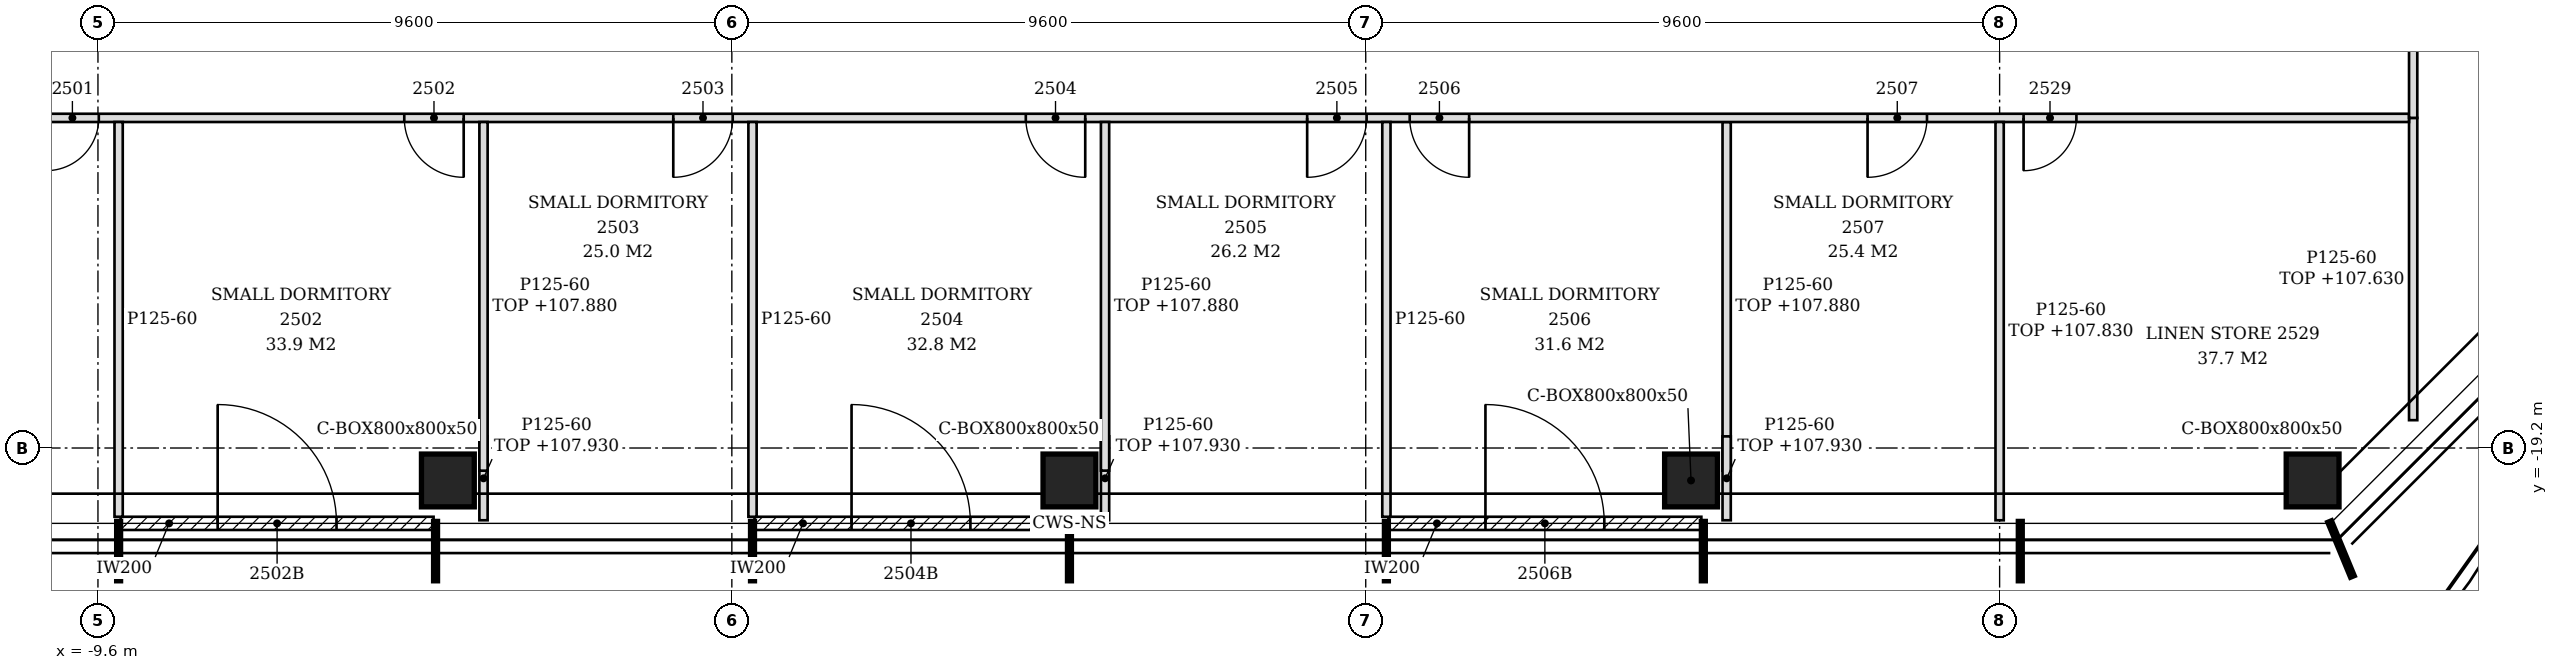
"""IFC4 building model, lengths in metres.
Left out: names, types, materials, properties, quantities, classifications, styles, units other than length and angle.
Written with IfcOpenShell. Run it as: python <this file> out.ifc"""

import sys

from ifc_helpers import new_model, si_unit, direction, frame, frame_2d, origin, origin_2d, place, context, subcontext, project, spatial, polyline, rectangle, hollow_rectangle, outline, extrude, clip, halfspace, element, fill, save


model = new_model("IFC4")
c1 = context("Model", 3, precision=1e-05, world=origin(), true_north=direction((0.0, 1.0)))
c2 = subcontext(c1, "Body", "Model", "MODEL_VIEW")
j1 = project(units=[si_unit("LENGTHUNIT", "METRE"), si_unit("PLANEANGLEUNIT", "RADIAN")], contexts=[c1])
p1 = place(None, origin())
s1 = spatial("IfcSite", under=j1, at=p1, CompositionType="ELEMENT")
p2 = place(p1, origin())
s2 = spatial("IfcBuilding", under=s1, at=p2, CompositionType="ELEMENT")
p3 = place(p2, frame((0.0, 0.0, 105.0)))
s3 = spatial("IfcBuildingStorey", under=s2, at=p3, CompositionType="ELEMENT", Elevation=105.0)
for number, where, z_axis, x_axis in (
    (1, (-4.301, -19.691, -0.15), (0.282, 0.188, 0.941), (-0.555, 0.832, 0.0)),
    (2, (5.113, -19.691, -0.15), (0.282, 0.188, 0.941), (-0.555, 0.832, 0.0)),
    (3, (14.527, -19.691, -0.15), (0.282, 0.188, 0.941), (-0.555, 0.832, 0.0)),
    (4, (23.94, -19.691, -0.15), (0.282, 0.188, 0.941), (-0.555, 0.832, 0.0)),
):
    element("IfcColumn", number, at=place(p3, frame(where, z_axis=z_axis, x_axis=x_axis)), inside=s3, PredefinedType="COLUMN", context=c2, shape_type="Clipping", body=[
        clip(clip(extrude(hollow_rectangle(XDim=0.8, YDim=0.8, WallThickness=0.05, at=origin_2d()), origin(), (0.0, 0.0, 1.0), 3.826), halfspace(frame((0.0, 0.0, 0.024), z_axis=(0.0, 0.0, 1.0), x_axis=(1.0, 0.0, 0.0)), True)), halfspace(frame((0.0, 0.0, 3.802), z_axis=(0.0, 0.0, 1.0), x_axis=(1.0, 0.0, 0.0)), False)),
    ])
p4 = place(p3, frame((-9.257, -20.341, 0.0), z_axis=(0.0, 0.0, 1.0), x_axis=(1.0, 0.0, 0.0)))
e5 = element("IfcWall", 5, at=p4, inside=s3, PredefinedType="NOTDEFINED", context=c2, shape_type="SweptSolid", body=[
    extrude(rectangle(XDim=4.74, YDim=0.2, at=frame_2d((2.37, 0.0))), origin(), (0.0, 0.0, 1.0), 3.45),
])
p5 = place(p4, frame((1.47, 0.0, 0.0)))
e6 = element("IfcOpeningElement", 6, at=p5, cuts=e5, PredefinedType="OPENING", context=c2, shape_type="SweptSolid", body=[
    extrude(rectangle(XDim=1.8, YDim=2.4, at=frame_2d((0.9, 1.2))), frame((0.0, 0.11, 0.0), z_axis=(0.0, -1.0, 0.0), x_axis=(1.0, 0.0, 0.0)), (0.0, 0.0, 1.0), 0.22),
])
p6 = place(p3, frame((0.343, -20.341, 0.0), z_axis=(0.0, 0.0, 1.0), x_axis=(1.0, 0.0, 0.0)))
e7 = element("IfcWall", 7, at=p6, inside=s3, PredefinedType="NOTDEFINED", context=c2, shape_type="SweptSolid", body=[
    extrude(rectangle(XDim=4.74, YDim=0.2, at=frame_2d((2.37, 0.0))), origin(), (0.0, 0.0, 1.0), 3.45),
])
p7 = place(p6, frame((1.47, 0.0, 0.0)))
e8 = element("IfcOpeningElement", 8, at=p7, cuts=e7, PredefinedType="OPENING", context=c2, shape_type="SweptSolid", body=[
    extrude(rectangle(XDim=1.8, YDim=2.4, at=frame_2d((0.9, 1.2))), frame((0.0, 0.11, 0.0), z_axis=(0.0, -1.0, 0.0), x_axis=(1.0, 0.0, 0.0)), (0.0, 0.0, 1.0), 0.22),
])
p8 = place(p3, frame((9.943, -20.341, 0.0), z_axis=(0.0, 0.0, 1.0), x_axis=(1.0, 0.0, 0.0)))
e9 = element("IfcWall", 9, at=p8, inside=s3, PredefinedType="NOTDEFINED", context=c2, shape_type="SweptSolid", body=[
    extrude(rectangle(XDim=4.74, YDim=0.2, at=frame_2d((2.37, 0.0))), origin(), (0.0, 0.0, 1.0), 3.45),
])
p9 = place(p8, frame((1.47, 0.0, 0.0)))
e10 = element("IfcOpeningElement", 10, at=p9, cuts=e9, PredefinedType="OPENING", context=c2, shape_type="SweptSolid", body=[
    extrude(rectangle(XDim=1.8, YDim=2.4, at=frame_2d((0.9, 1.2))), frame((0.0, 0.11, 0.0), z_axis=(0.0, -1.0, 0.0), x_axis=(1.0, 0.0, 0.0)), (0.0, 0.0, 1.0), 0.22),
])
p10 = place(p3, frame((-3.761, -20.294, 0.0), z_axis=(0.0, 0.0, 1.0), x_axis=(0.0, 1.0, 0.0)))
e11 = element("IfcWall", 11, at=p10, inside=s3, PredefinedType="PARTITIONING", context=c2, shape_type="SweptSolid", body=[
    extrude(outline(polyline([(0.0, 0.0), (0.44, 0.0), (0.44, 0.863), (0.44, 1.725), (0.71, 2.587), (0.933, 2.93), (0.0, 2.93), (0.0, 2.587), (0.0, 1.725), (0.0, 0.863), (0.0, 0.0)])), frame((0.0, 0.062, 0.0), z_axis=(0.0, -1.0, 0.0), x_axis=(1.0, 0.0, 0.0)), (0.0, 0.0, 1.0), 0.125),
])
p11 = place(p3, frame((5.652, -20.294, 0.0), z_axis=(0.0, 0.0, 1.0), x_axis=(0.0, 1.0, 0.0)))
e12 = element("IfcWall", 12, at=p11, inside=s3, PredefinedType="PARTITIONING", context=c2, shape_type="SweptSolid", body=[
    extrude(outline(polyline([(0.0, 0.0), (0.44, 0.0), (0.44, 0.863), (0.44, 1.725), (0.711, 2.587), (0.934, 2.93), (0.0, 2.93), (0.0, 2.587), (0.0, 1.725), (0.0, 0.863), (0.0, 0.0)])), frame((0.0, 0.062, 0.0), z_axis=(0.0, -1.0, 0.0), x_axis=(1.0, 0.0, 0.0)), (0.0, 0.0, 1.0), 0.125),
])
p12 = place(p3, frame((15.066, -20.294, 0.0), z_axis=(0.0, 0.0, 1.0), x_axis=(0.0, 1.0, 0.0)))
e13 = element("IfcWall", 13, at=p12, inside=s3, PredefinedType="PARTITIONING", context=c2, shape_type="SweptSolid", body=[
    extrude(outline(polyline([(0.0, 0.0), (0.44, 0.0), (0.44, 0.863), (0.44, 1.725), (0.711, 2.587), (0.933, 2.93), (0.0, 2.93), (0.0, 2.587), (0.0, 1.725), (0.0, 0.863), (0.0, 0.0)])), frame((0.0, 0.062, 0.0), z_axis=(0.0, -1.0, 0.0), x_axis=(1.0, 0.0, 0.0)), (0.0, 0.0, 1.0), 0.125),
])
p13 = place(p3, frame((19.2, -20.294, 0.0), z_axis=(0.0, 0.0, 1.0), x_axis=(0.0, 1.0, 0.0)))
e14 = element("IfcWall", 14, at=p13, inside=s3, PredefinedType="PARTITIONING", context=c2, shape_type="SweptSolid", body=[
    extrude(rectangle(XDim=6.032, YDim=0.125, at=frame_2d((3.016, 0.0))), origin(), (0.0, 0.0, 1.0), 2.83),
])
p14 = place(p3, frame((-9.287, -20.241, 0.0), z_axis=(0.0, 0.0, 1.0), x_axis=(0.0, 1.0, 0.0)))
e15 = element("IfcWall", 15, at=p14, inside=s3, PredefinedType="PARTITIONING", context=c2, shape_type="SweptSolid", body=[
    extrude(outline(polyline([(0.0, 0.0), (5.979, 0.0), (5.979, 3.45), (5.269, 3.45), (5.267, 2.93), (5.069, 2.93), (5.067, 3.45), (1.419, 3.45), (1.417, 2.93), (1.119, 2.93), (1.117, 3.45), (0.0, 3.45), (0.0, 0.0)])), frame((0.0, 0.062, 0.0), z_axis=(0.0, -1.0, 0.0), x_axis=(1.0, 0.0, 0.0)), (0.0, 0.0, 1.0), 0.125),
])
for number, where, z_axis, x_axis in (
    (16, (0.313, -20.241, 0.0), (0.0, 0.0, 1.0), (0.0, 1.0, 0.0)),
    (17, (9.913, -20.241, 0.0), (0.0, 0.0, 1.0), (0.0, 1.0, 0.0)),
):
    element("IfcWall", number, at=place(p3, frame(where, z_axis=z_axis, x_axis=x_axis)), inside=s3, PredefinedType="PARTITIONING", context=c2, shape_type="SweptSolid", body=[
        extrude(outline(polyline([(0.0, 0.0), (5.979, 0.0), (5.979, 3.45), (5.274, 3.45), (5.272, 2.88), (5.064, 2.88), (5.062, 3.45), (1.419, 3.45), (1.417, 2.93), (1.119, 2.93), (1.117, 3.45), (0.0, 3.45), (0.0, 0.0)])), frame((0.0, 0.062, 0.0), z_axis=(0.0, -1.0, 0.0), x_axis=(1.0, 0.0, 0.0)), (0.0, 0.0, 1.0), 0.125),
    ])
p15 = place(p3, frame((-3.761, -19.543, 0.0), z_axis=(0.0, 0.0, 1.0), x_axis=(0.0, 1.0, 0.0)))
e18 = element("IfcWall", 18, at=p15, inside=s3, PredefinedType="PARTITIONING", context=c2, shape_type="SweptSolid", body=[
    extrude(outline(polyline([(0.0, 0.0), (5.281, 0.0), (5.281, 0.863), (5.281, 1.725), (5.281, 2.587), (5.281, 2.88), (0.734, 2.88), (0.734, 2.587), (0.734, 1.725), (0.56, 0.863), (0.0, 0.0)])), frame((0.0, 0.062, 0.0), z_axis=(0.0, -1.0, 0.0), x_axis=(1.0, 0.0, 0.0)), (0.0, 0.0, 1.0), 0.125),
])
p16 = place(p3, frame((5.652, -19.542, 0.0), z_axis=(0.0, 0.0, 1.0), x_axis=(0.0, 1.0, 0.0)))
e19 = element("IfcWall", 19, at=p16, inside=s3, PredefinedType="PARTITIONING", context=c2, shape_type="SweptSolid", body=[
    extrude(outline(polyline([(0.0, 0.0), (5.28, 0.0), (5.28, 0.863), (5.28, 1.725), (5.28, 2.587), (5.28, 2.88), (0.733, 2.88), (0.733, 2.587), (0.733, 1.725), (0.56, 0.863), (0.0, 0.0)])), frame((0.0, 0.062, 0.0), z_axis=(0.0, -1.0, 0.0), x_axis=(1.0, 0.0, 0.0)), (0.0, 0.0, 1.0), 0.125),
])
p17 = place(p3, frame((15.066, -19.543, 0.0), z_axis=(0.0, 0.0, 1.0), x_axis=(0.0, 1.0, 0.0)))
e20 = element("IfcWall", 20, at=p17, inside=s3, PredefinedType="PARTITIONING", context=c2, shape_type="SweptSolid", body=[
    extrude(outline(polyline([(0.0, 0.0), (5.281, 0.0), (5.281, 0.863), (5.281, 1.725), (5.281, 2.587), (5.281, 2.88), (0.734, 2.88), (0.734, 2.587), (0.734, 1.725), (0.56, 0.863), (0.0, 0.0)])), frame((0.0, 0.062, 0.0), z_axis=(0.0, -1.0, 0.0), x_axis=(1.0, 0.0, 0.0)), (0.0, 0.0, 1.0), 0.125),
])
p18 = place(p3, frame((25.463, -18.778, 0.0), z_axis=(0.0, 0.0, 1.0), x_axis=(0.0, 1.0, 0.0)))
e21 = element("IfcWall", 21, at=p18, inside=s3, PredefinedType="PARTITIONING", context=c2, shape_type="SweptSolid", body=[
    extrude(outline(polyline([(0.0, 0.0), (4.578, 0.0), (4.578, 0.863), (4.578, 1.725), (4.578, 2.587), (4.578, 2.63), (0.0, 2.63), (0.0, 2.587), (0.0, 1.725), (0.0, 0.863), (0.0, 0.0)])), frame((0.0, 0.062, 0.0), z_axis=(0.0, -1.0, 0.0), x_axis=(1.0, 0.0, 0.0)), (0.0, 0.0, 1.0), 0.125),
])
p19 = place(p3, frame((-16.777, -14.2, 0.0), z_axis=(0.0, 0.0, 1.0), x_axis=(1.0, 0.0, 0.0)))
e22 = element("IfcWall", 22, at=p19, inside=s3, PredefinedType="PARTITIONING", context=c2, shape_type="SweptSolid", body=[
    extrude(outline(polyline([(0.0, 0.0), (42.177, 0.0), (42.177, 0.863), (42.177, 1.725), (42.177, 2.587), (42.177, 2.83), (0.0, 2.83), (0.0, 2.587), (0.0, 1.725), (0.0, 0.863), (0.0, 0.0)])), frame((0.0, 0.062, 0.0), z_axis=(0.0, -1.0, 0.0), x_axis=(1.0, 0.0, 0.0)), (0.0, 0.0, 1.0), 0.125),
])
p20 = place(p19, frame((6.39, 0.0, 0.0)))
e23 = element("IfcOpeningElement", 23, at=p20, cuts=e22, PredefinedType="OPENING", context=c2, shape_type="SweptSolid", body=[
    extrude(rectangle(XDim=0.8, YDim=2.1, at=frame_2d((0.4, 1.05))), frame((0.0, 0.073, 0.0), z_axis=(0.0, -1.0, 0.0), x_axis=(1.0, 0.0, 0.0)), (0.0, 0.0, 1.0), 0.145),
])
p21 = place(p19, frame((11.816, 0.0, 0.0)))
e24 = element("IfcOpeningElement", 24, at=p21, cuts=e22, PredefinedType="OPENING", context=c2, shape_type="SweptSolid", body=[
    extrude(rectangle(XDim=0.9, YDim=2.1, at=frame_2d((0.45, 1.05))), frame((0.0, 0.073, 0.0), z_axis=(0.0, -1.0, 0.0), x_axis=(1.0, 0.0, 0.0)), (0.0, 0.0, 1.0), 0.145),
])
p22 = place(p19, frame((15.89, 0.0, 0.0)))
e25 = element("IfcOpeningElement", 25, at=p22, cuts=e22, PredefinedType="OPENING", context=c2, shape_type="SweptSolid", body=[
    extrude(rectangle(XDim=0.9, YDim=2.1, at=frame_2d((0.45, 1.05))), frame((0.0, 0.073, 0.0), z_axis=(0.0, -1.0, 0.0), x_axis=(1.0, 0.0, 0.0)), (0.0, 0.0, 1.0), 0.145),
])
p23 = place(p19, frame((21.229, 0.0, 0.0)))
e26 = element("IfcOpeningElement", 26, at=p23, cuts=e22, PredefinedType="OPENING", context=c2, shape_type="SweptSolid", body=[
    extrude(rectangle(XDim=0.9, YDim=2.1, at=frame_2d((0.45, 1.05))), frame((0.0, 0.073, 0.0), z_axis=(0.0, -1.0, 0.0), x_axis=(1.0, 0.0, 0.0)), (0.0, 0.0, 1.0), 0.145),
])
p24 = place(p19, frame((25.49, 0.0, 0.0)))
e27 = element("IfcOpeningElement", 27, at=p24, cuts=e22, PredefinedType="OPENING", context=c2, shape_type="SweptSolid", body=[
    extrude(rectangle(XDim=0.9, YDim=2.1, at=frame_2d((0.45, 1.05))), frame((0.0, 0.073, 0.0), z_axis=(0.0, -1.0, 0.0), x_axis=(1.0, 0.0, 0.0)), (0.0, 0.0, 1.0), 0.145),
])
p25 = place(p19, frame((27.042, 0.0, 0.0)))
e28 = element("IfcOpeningElement", 28, at=p25, cuts=e22, PredefinedType="OPENING", context=c2, shape_type="SweptSolid", body=[
    extrude(rectangle(XDim=0.9, YDim=2.1, at=frame_2d((0.45, 1.05))), frame((0.0, 0.073, 0.0), z_axis=(0.0, -1.0, 0.0), x_axis=(1.0, 0.0, 0.0)), (0.0, 0.0, 1.0), 0.145),
])
p26 = place(p19, frame((33.977, 0.0, 0.0)))
e29 = element("IfcOpeningElement", 29, at=p26, cuts=e22, PredefinedType="OPENING", context=c2, shape_type="SweptSolid", body=[
    extrude(rectangle(XDim=0.9, YDim=2.1, at=frame_2d((0.45, 1.05))), frame((0.0, 0.073, 0.0), z_axis=(0.0, -1.0, 0.0), x_axis=(1.0, 0.0, 0.0)), (0.0, 0.0, 1.0), 0.145),
])
p27 = place(p19, frame((36.34, 0.0, 0.0)))
e30 = element("IfcOpeningElement", 30, at=p27, cuts=e22, PredefinedType="OPENING", context=c2, shape_type="SweptSolid", body=[
    extrude(rectangle(XDim=0.8, YDim=2.1, at=frame_2d((0.4, 1.05))), frame((0.0, 0.073, 0.0), z_axis=(0.0, -1.0, 0.0), x_axis=(1.0, 0.0, 0.0)), (0.0, 0.0, 1.0), 0.145),
])
p28 = place(p3, frame((25.463, -14.2, 0.0), z_axis=(0.0, 0.0, 1.0), x_axis=(0.0, 1.0, 0.0)))
e31 = element("IfcWall", 31, at=p28, inside=s3, PredefinedType="PARTITIONING", context=c2, shape_type="SweptSolid", body=[
    extrude(outline(polyline([(0.0, 0.0), (27.4, 0.0), (27.4, 3.45), (23.238, 3.45), (23.236, 2.83), (23.018, 2.83), (23.016, 3.45), (18.438, 3.45), (18.436, 2.83), (18.218, 2.83), (18.216, 3.45), (13.638, 3.45), (13.636, 2.83), (13.418, 2.83), (13.416, 3.45), (8.838, 3.45), (8.836, 2.83), (8.618, 2.83), (8.616, 3.45), (4.038, 3.45), (4.036, 2.83), (3.818, 2.83), (3.816, 3.45), (0.0, 3.45), (0.0, 0.0)])), frame((0.0, 0.062, 0.0), z_axis=(0.0, -1.0, 0.0), x_axis=(1.0, 0.0, 0.0)), (0.0, 0.0, 1.0), 0.125),
])
p29 = place(p28, frame((6.809, 0.0, 0.0)))
e32 = element("IfcOpeningElement", 32, at=p29, cuts=e31, PredefinedType="OPENING", context=c2, shape_type="SweptSolid", body=[
    extrude(rectangle(XDim=0.9, YDim=2.1, at=frame_2d((0.45, 1.05))), frame((0.0, 0.073, 0.0), z_axis=(0.0, -1.0, 0.0), x_axis=(1.0, 0.0, 0.0)), (0.0, 0.0, 1.0), 0.145),
])
p30 = place(p28, frame((9.709, 0.0, 0.0)))
e33 = element("IfcOpeningElement", 33, at=p30, cuts=e31, PredefinedType="OPENING", context=c2, shape_type="SweptSolid", body=[
    extrude(rectangle(XDim=0.9, YDim=2.1, at=frame_2d((0.45, 1.05))), frame((0.0, 0.073, 0.0), z_axis=(0.0, -1.0, 0.0), x_axis=(1.0, 0.0, 0.0)), (0.0, 0.0, 1.0), 0.145),
])
p31 = place(p28, frame((13.109, 0.0, 0.0)))
e34 = element("IfcOpeningElement", 34, at=p31, cuts=e31, PredefinedType="OPENING", context=c2, shape_type="SweptSolid", body=[
    extrude(rectangle(XDim=0.9, YDim=2.1, at=frame_2d((0.45, 1.05))), frame((0.0, 0.073, 0.0), z_axis=(0.0, -1.0, 0.0), x_axis=(1.0, 0.0, 0.0)), (0.0, 0.0, 1.0), 0.145),
])
p32 = place(p28, frame((22.6, 0.0, 0.0)))
e35 = element("IfcOpeningElement", 35, at=p32, cuts=e31, PredefinedType="OPENING", context=c2, shape_type="SweptSolid", body=[
    extrude(rectangle(XDim=0.9, YDim=2.1, at=frame_2d((0.45, 1.05))), frame((0.0, 0.073, 0.0), z_axis=(0.0, -1.0, 0.0), x_axis=(1.0, 0.0, 0.0)), (0.0, 0.0, 1.0), 0.145),
])
p33 = place(p5, origin())
e36 = element("IfcDoor", 36, at=p33, inside=s3, OperationType="SINGLE_SWING_LEFT", PredefinedType="DOOR", context=c2, shape_type="SweptSolid", body=[
    extrude(rectangle(XDim=1.8, YDim=2.4, at=frame_2d((0.9, 1.2))), frame((0.0, 0.025, 0.0), z_axis=(0.0, -1.0, 0.0), x_axis=(1.0, 0.0, 0.0)), (0.0, 0.0, 1.0), 0.05),
])
fill(e6, e36)
p34 = place(p7, origin())
e37 = element("IfcDoor", 37, at=p34, inside=s3, OperationType="SINGLE_SWING_LEFT", PredefinedType="DOOR", context=c2, shape_type="SweptSolid", body=[
    extrude(rectangle(XDim=1.8, YDim=2.4, at=frame_2d((0.9, 1.2))), frame((0.0, 0.025, 0.0), z_axis=(0.0, -1.0, 0.0), x_axis=(1.0, 0.0, 0.0)), (0.0, 0.0, 1.0), 0.05),
])
fill(e8, e37)
p35 = place(p9, origin())
e38 = element("IfcDoor", 38, at=p35, inside=s3, OperationType="SINGLE_SWING_LEFT", PredefinedType="DOOR", context=c2, shape_type="SweptSolid", body=[
    extrude(rectangle(XDim=1.8, YDim=2.4, at=frame_2d((0.9, 1.2))), frame((0.0, 0.025, 0.0), z_axis=(0.0, -1.0, 0.0), x_axis=(1.0, 0.0, 0.0)), (0.0, 0.0, 1.0), 0.05),
])
fill(e10, e38)
p36 = place(p20, frame((0.8, 0.0, 0.0), z_axis=(0.0, 0.0, 1.0), x_axis=(-1.0, 0.0, 0.0)))
e39 = element("IfcDoor", 39, at=p36, inside=s3, OperationType="SINGLE_SWING_RIGHT", PredefinedType="DOOR", context=c2, shape_type="SweptSolid", body=[
    extrude(rectangle(XDim=0.8, YDim=2.1, at=frame_2d((0.4, 1.05))), frame((0.0, 0.025, 0.0), z_axis=(0.0, -1.0, 0.0), x_axis=(1.0, 0.0, 0.0)), (0.0, 0.0, 1.0), 0.05),
])
fill(e23, e39)
p37 = place(p21, frame((0.9, 0.0, 0.0), z_axis=(0.0, 0.0, 1.0), x_axis=(-1.0, 0.0, 0.0)))
e40 = element("IfcDoor", 40, at=p37, inside=s3, OperationType="SINGLE_SWING_LEFT", PredefinedType="DOOR", context=c2, shape_type="SweptSolid", body=[
    extrude(rectangle(XDim=0.9, YDim=2.1, at=frame_2d((0.45, 1.05))), frame((0.0, 0.025, 0.0), z_axis=(0.0, -1.0, 0.0), x_axis=(1.0, 0.0, 0.0)), (0.0, 0.0, 1.0), 0.05),
])
fill(e24, e40)
p38 = place(p22, frame((0.9, 0.0, 0.0), z_axis=(0.0, 0.0, 1.0), x_axis=(-1.0, 0.0, 0.0)))
e41 = element("IfcDoor", 41, at=p38, inside=s3, OperationType="SINGLE_SWING_RIGHT", PredefinedType="DOOR", context=c2, shape_type="SweptSolid", body=[
    extrude(rectangle(XDim=0.9, YDim=2.1, at=frame_2d((0.45, 1.05))), frame((0.0, 0.025, 0.0), z_axis=(0.0, -1.0, 0.0), x_axis=(1.0, 0.0, 0.0)), (0.0, 0.0, 1.0), 0.05),
])
fill(e25, e41)
p39 = place(p23, frame((0.9, 0.0, 0.0), z_axis=(0.0, 0.0, 1.0), x_axis=(-1.0, 0.0, 0.0)))
e42 = element("IfcDoor", 42, at=p39, inside=s3, OperationType="SINGLE_SWING_LEFT", PredefinedType="DOOR", context=c2, shape_type="SweptSolid", body=[
    extrude(rectangle(XDim=0.9, YDim=2.1, at=frame_2d((0.45, 1.05))), frame((0.0, 0.025, 0.0), z_axis=(0.0, -1.0, 0.0), x_axis=(1.0, 0.0, 0.0)), (0.0, 0.0, 1.0), 0.05),
])
fill(e26, e42)
p40 = place(p24, frame((0.9, 0.0, 0.0), z_axis=(0.0, 0.0, 1.0), x_axis=(-1.0, 0.0, 0.0)))
e43 = element("IfcDoor", 43, at=p40, inside=s3, OperationType="SINGLE_SWING_RIGHT", PredefinedType="DOOR", context=c2, shape_type="SweptSolid", body=[
    extrude(rectangle(XDim=0.9, YDim=2.1, at=frame_2d((0.45, 1.05))), frame((0.0, 0.025, 0.0), z_axis=(0.0, -1.0, 0.0), x_axis=(1.0, 0.0, 0.0)), (0.0, 0.0, 1.0), 0.05),
])
fill(e27, e43)
p41 = place(p25, frame((0.9, 0.0, 0.0), z_axis=(0.0, 0.0, 1.0), x_axis=(-1.0, 0.0, 0.0)))
e44 = element("IfcDoor", 44, at=p41, inside=s3, OperationType="SINGLE_SWING_LEFT", PredefinedType="DOOR", context=c2, shape_type="SweptSolid", body=[
    extrude(rectangle(XDim=0.9, YDim=2.1, at=frame_2d((0.45, 1.05))), frame((0.0, 0.025, 0.0), z_axis=(0.0, -1.0, 0.0), x_axis=(1.0, 0.0, 0.0)), (0.0, 0.0, 1.0), 0.05),
])
fill(e28, e44)
p42 = place(p26, frame((0.9, 0.0, 0.0), z_axis=(0.0, 0.0, 1.0), x_axis=(-1.0, 0.0, 0.0)))
e45 = element("IfcDoor", 45, at=p42, inside=s3, OperationType="SINGLE_SWING_RIGHT", PredefinedType="DOOR", context=c2, shape_type="SweptSolid", body=[
    extrude(rectangle(XDim=0.9, YDim=2.1, at=frame_2d((0.45, 1.05))), frame((0.0, 0.025, 0.0), z_axis=(0.0, -1.0, 0.0), x_axis=(1.0, 0.0, 0.0)), (0.0, 0.0, 1.0), 0.05),
])
fill(e29, e45)
p43 = place(p27, frame((0.8, 0.0, 0.0), z_axis=(0.0, 0.0, 1.0), x_axis=(-1.0, 0.0, 0.0)))
e46 = element("IfcDoor", 46, at=p43, inside=s3, OperationType="SINGLE_SWING_RIGHT", PredefinedType="DOOR", context=c2, shape_type="SweptSolid", body=[
    extrude(rectangle(XDim=0.8, YDim=2.1, at=frame_2d((0.4, 1.05))), frame((0.0, 0.025, 0.0), z_axis=(0.0, -1.0, 0.0), x_axis=(1.0, 0.0, 0.0)), (0.0, 0.0, 1.0), 0.05),
])
fill(e30, e46)
save(model, sys.argv[1])
